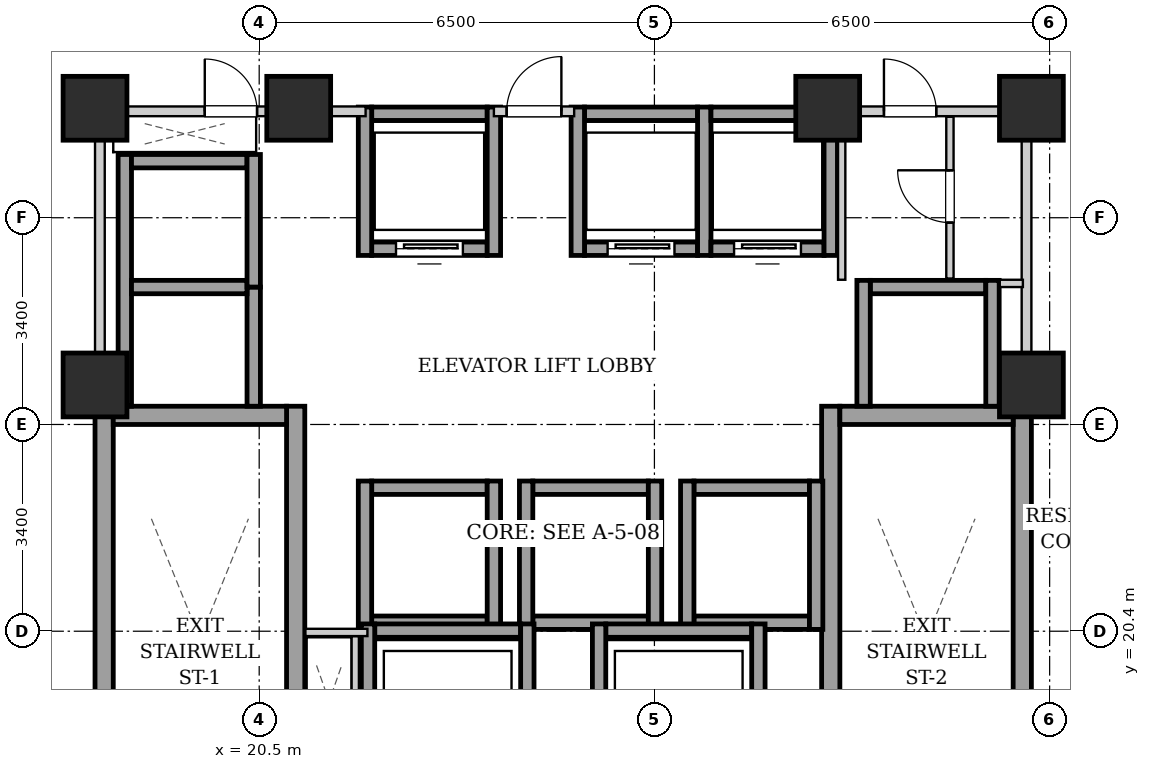
"""IFC4 building model, lengths in metres.
Left out: names, types, materials, properties, quantities, classifications, styles, units other than length and angle.
Written with IfcOpenShell. Run it as: python <this file> out.ifc"""

import sys

from ifc_helpers import new_model, si_unit, direction, frame, frame_2d, origin, origin_2d, place, context, subcontext, project, spatial, rectangle, extrude, element, fill, save


model = new_model("IFC4")
c1 = context("Model", 3, precision=1e-05, world=origin(), true_north=direction((0.0, 1.0)))
c2 = subcontext(c1, "Body", "Model", "MODEL_VIEW")
j1 = project(units=[si_unit("LENGTHUNIT", "METRE"), si_unit("PLANEANGLEUNIT", "RADIAN")], contexts=[c1])
p1 = place(None, origin())
s1 = spatial("IfcSite", under=j1, at=p1, CompositionType="ELEMENT")
p2 = place(p1, origin())
s2 = spatial("IfcBuilding", under=s1, at=p2, CompositionType="ELEMENT")
p3 = place(p2, frame((0.0, 0.0, 91.1)))
s3 = spatial("IfcBuildingStorey", under=s2, at=p3, CompositionType="ELEMENT", Elevation=91.1)
for number, where, z_axis, x_axis in (
    (1, (17.8, 29.0, 0.0), (0.0, 0.0, 1.0), (1.0, 0.0, 0.0)),
    (2, (21.15, 29.0, 0.0), (0.0, 0.0, 1.0), (1.0, 0.0, 0.0)),
    (3, (29.85, 29.0, 0.0), (0.0, 0.0, 1.0), (1.0, 0.0, 0.0)),
    (4, (33.2, 29.0, 0.0), (0.0, 0.0, 1.0), (1.0, 0.0, 0.0)),
    (5, (17.8, 24.45, 0.0), (0.0, 0.0, 1.0), (1.0, 0.0, 0.0)),
    (6, (33.2, 24.45, 0.0), (0.0, 0.0, 1.0), (1.0, 0.0, 0.0)),
):
    element("IfcColumn", number, at=place(p3, frame(where, z_axis=z_axis, x_axis=x_axis)), inside=s3, PredefinedType="COLUMN", context=c2, shape_type="SweptSolid", body=[
        extrude(rectangle(XDim=1.05, YDim=1.05, at=origin_2d()), origin(), (0.0, 0.0, 1.0), 3.2),
    ])
for number, where, z_axis, x_axis in (
    (7, (17.95, 15.1, 0.0), (0.0, 0.0, 1.0), (0.0, 1.0, 0.0)),
    (8, (21.1, 15.1, 0.0), (0.0, 0.0, 1.0), (0.0, 1.0, 0.0)),
):
    element("IfcWall", number, at=place(p3, frame(where, z_axis=z_axis, x_axis=x_axis)), inside=s3, PredefinedType="SHEAR", context=c2, shape_type="SweptSolid", body=[
        extrude(rectangle(XDim=9.0, YDim=0.3, at=frame_2d((4.5, 0.0))), origin(), (0.0, 0.0, 1.0), 2.94),
    ])
p4 = place(p3, frame((18.1, 23.95, 0.0), z_axis=(0.0, 0.0, 1.0), x_axis=(1.0, 0.0, 0.0)))
e9 = element("IfcWall", 9, at=p4, inside=s3, PredefinedType="SHEAR", context=c2, shape_type="SweptSolid", body=[
    extrude(rectangle(XDim=2.85, YDim=0.3, at=frame_2d((1.425, 0.0))), origin(), (0.0, 0.0, 1.0), 2.94),
])
for number, where, z_axis, x_axis in (
    (10, (29.9, 15.1, 0.0), (0.0, 0.0, 1.0), (0.0, 1.0, 0.0)),
    (11, (33.05, 15.1, 0.0), (0.0, 0.0, 1.0), (0.0, 1.0, 0.0)),
):
    element("IfcWall", number, at=place(p3, frame(where, z_axis=z_axis, x_axis=x_axis)), inside=s3, PredefinedType="SHEAR", context=c2, shape_type="SweptSolid", body=[
        extrude(rectangle(XDim=9.0, YDim=0.3, at=frame_2d((4.5, 0.0))), origin(), (0.0, 0.0, 1.0), 2.94),
    ])
p5 = place(p3, frame((30.05, 23.95, 0.0), z_axis=(0.0, 0.0, 1.0), x_axis=(1.0, 0.0, 0.0)))
e12 = element("IfcWall", 12, at=p5, inside=s3, PredefinedType="SHEAR", context=c2, shape_type="SweptSolid", body=[
    extrude(rectangle(XDim=2.85, YDim=0.3, at=frame_2d((1.425, 0.0))), origin(), (0.0, 0.0, 1.0), 2.94),
])
p6 = place(p3, frame((22.35, 26.69, 0.0), z_axis=(0.0, 0.0, 1.0), x_axis=(1.0, 0.0, 0.0)))
e13 = element("IfcWall", 13, at=p6, inside=s3, PredefinedType="SHEAR", context=c2, shape_type="SweptSolid", body=[
    extrude(rectangle(XDim=1.9, YDim=0.22, at=frame_2d((0.95, 0.0))), origin(), (0.0, 0.0, 1.0), 2.94),
])
p7 = place(p6, frame((0.4, 0.0, 0.0)))
e14 = element("IfcOpeningElement", 14, at=p7, cuts=e13, PredefinedType="OPENING", context=c2, shape_type="SweptSolid", body=[
    extrude(rectangle(XDim=1.1, YDim=2.15, at=frame_2d((0.55, 1.075))), frame((0.0, 0.12, 0.0), z_axis=(0.0, -1.0, 0.0), x_axis=(1.0, 0.0, 0.0)), (0.0, 0.0, 1.0), 0.24),
])
p8 = place(p3, frame((22.35, 28.91, 0.0), z_axis=(0.0, 0.0, 1.0), x_axis=(1.0, 0.0, 0.0)))
e15 = element("IfcWall", 15, at=p8, inside=s3, PredefinedType="SHEAR", context=c2, shape_type="SweptSolid", body=[
    extrude(rectangle(XDim=1.9, YDim=0.22, at=frame_2d((0.95, 0.0))), origin(), (0.0, 0.0, 1.0), 2.94),
])
for number, where, z_axis, x_axis in (
    (16, (22.24, 26.58, 0.0), (0.0, 0.0, 1.0), (0.0, 1.0, 0.0)),
    (17, (24.36, 26.58, 0.0), (0.0, 0.0, 1.0), (0.0, 1.0, 0.0)),
):
    element("IfcWall", number, at=place(p3, frame(where, z_axis=z_axis, x_axis=x_axis)), inside=s3, PredefinedType="SHEAR", context=c2, shape_type="SweptSolid", body=[
        extrude(rectangle(XDim=2.44, YDim=0.22, at=frame_2d((1.22, 0.0))), origin(), (0.0, 0.0, 1.0), 2.94),
    ])
p9 = place(p3, frame((25.85, 26.69, 0.0), z_axis=(0.0, 0.0, 1.0), x_axis=(1.0, 0.0, 0.0)))
e18 = element("IfcWall", 18, at=p9, inside=s3, PredefinedType="SHEAR", context=c2, shape_type="SweptSolid", body=[
    extrude(rectangle(XDim=1.86, YDim=0.22, at=frame_2d((0.93, 0.0))), origin(), (0.0, 0.0, 1.0), 2.94),
])
p10 = place(p9, frame((0.38, 0.0, 0.0)))
e19 = element("IfcOpeningElement", 19, at=p10, cuts=e18, PredefinedType="OPENING", context=c2, shape_type="SweptSolid", body=[
    extrude(rectangle(XDim=1.1, YDim=2.15, at=frame_2d((0.55, 1.075))), frame((0.0, 0.12, 0.0), z_axis=(0.0, -1.0, 0.0), x_axis=(1.0, 0.0, 0.0)), (0.0, 0.0, 1.0), 0.24),
])
p11 = place(p3, frame((25.85, 28.91, 0.0), z_axis=(0.0, 0.0, 1.0), x_axis=(1.0, 0.0, 0.0)))
e20 = element("IfcWall", 20, at=p11, inside=s3, PredefinedType="SHEAR", context=c2, shape_type="SweptSolid", body=[
    extrude(rectangle(XDim=1.86, YDim=0.22, at=frame_2d((0.93, 0.0))), origin(), (0.0, 0.0, 1.0), 2.94),
])
for number, where, z_axis, x_axis in (
    (21, (25.74, 26.58, 0.0), (0.0, 0.0, 1.0), (0.0, 1.0, 0.0)),
    (22, (27.82, 26.58, 0.0), (0.0, 0.0, 1.0), (0.0, 1.0, 0.0)),
):
    element("IfcWall", number, at=place(p3, frame(where, z_axis=z_axis, x_axis=x_axis)), inside=s3, PredefinedType="SHEAR", context=c2, shape_type="SweptSolid", body=[
        extrude(rectangle(XDim=2.44, YDim=0.22, at=frame_2d((1.22, 0.0))), origin(), (0.0, 0.0, 1.0), 2.94),
    ])
p12 = place(p3, frame((27.93, 26.69, 0.0), z_axis=(0.0, 0.0, 1.0), x_axis=(1.0, 0.0, 0.0)))
e23 = element("IfcWall", 23, at=p12, inside=s3, PredefinedType="SHEAR", context=c2, shape_type="SweptSolid", body=[
    extrude(rectangle(XDim=1.86, YDim=0.22, at=frame_2d((0.93, 0.0))), origin(), (0.0, 0.0, 1.0), 2.94),
])
p13 = place(p12, frame((0.38, 0.0, 0.0)))
e24 = element("IfcOpeningElement", 24, at=p13, cuts=e23, PredefinedType="OPENING", context=c2, shape_type="SweptSolid", body=[
    extrude(rectangle(XDim=1.1, YDim=2.15, at=frame_2d((0.55, 1.075))), frame((0.0, 0.12, 0.0), z_axis=(0.0, -1.0, 0.0), x_axis=(1.0, 0.0, 0.0)), (0.0, 0.0, 1.0), 0.24),
])
p14 = place(p3, frame((27.93, 28.91, 0.0), z_axis=(0.0, 0.0, 1.0), x_axis=(1.0, 0.0, 0.0)))
e25 = element("IfcWall", 25, at=p14, inside=s3, PredefinedType="SHEAR", context=c2, shape_type="SweptSolid", body=[
    extrude(rectangle(XDim=1.86, YDim=0.22, at=frame_2d((0.93, 0.0))), origin(), (0.0, 0.0, 1.0), 2.94),
])
p15 = place(p3, frame((29.9, 26.58, 0.0), z_axis=(0.0, 0.0, 1.0), x_axis=(0.0, 1.0, 0.0)))
e26 = element("IfcWall", 26, at=p15, inside=s3, PredefinedType="SHEAR", context=c2, shape_type="SweptSolid", body=[
    extrude(rectangle(XDim=2.44, YDim=0.22, at=frame_2d((1.22, 0.0))), origin(), (0.0, 0.0, 1.0), 2.94),
])
for number, where, z_axis, x_axis in (
    (27, (22.35, 20.54, 0.0), (0.0, 0.0, 1.0), (1.0, 0.0, 0.0)),
    (28, (22.35, 22.76, 0.0), (0.0, 0.0, 1.0), (1.0, 0.0, 0.0)),
):
    element("IfcWall", number, at=place(p3, frame(where, z_axis=z_axis, x_axis=x_axis)), inside=s3, PredefinedType="SHEAR", context=c2, shape_type="SweptSolid", body=[
        extrude(rectangle(XDim=1.9, YDim=0.22, at=frame_2d((0.95, 0.0))), origin(), (0.0, 0.0, 1.0), 2.94),
    ])
for number, where, z_axis, x_axis in (
    (29, (22.24, 20.43, 0.0), (0.0, 0.0, 1.0), (0.0, 1.0, 0.0)),
    (30, (24.36, 20.43, 0.0), (0.0, 0.0, 1.0), (0.0, 1.0, 0.0)),
):
    element("IfcWall", number, at=place(p3, frame(where, z_axis=z_axis, x_axis=x_axis)), inside=s3, PredefinedType="SHEAR", context=c2, shape_type="SweptSolid", body=[
        extrude(rectangle(XDim=2.44, YDim=0.22, at=frame_2d((1.22, 0.0))), origin(), (0.0, 0.0, 1.0), 2.94),
    ])
for number, where, z_axis, x_axis in (
    (31, (25.0, 20.54, 0.0), (0.0, 0.0, 1.0), (1.0, 0.0, 0.0)),
    (32, (25.0, 22.76, 0.0), (0.0, 0.0, 1.0), (1.0, 0.0, 0.0)),
):
    element("IfcWall", number, at=place(p3, frame(where, z_axis=z_axis, x_axis=x_axis)), inside=s3, PredefinedType="SHEAR", context=c2, shape_type="SweptSolid", body=[
        extrude(rectangle(XDim=1.9, YDim=0.22, at=frame_2d((0.95, 0.0))), origin(), (0.0, 0.0, 1.0), 2.94),
    ])
for number, where, z_axis, x_axis in (
    (33, (24.89, 20.43, 0.0), (0.0, 0.0, 1.0), (0.0, 1.0, 0.0)),
    (34, (27.01, 20.43, 0.0), (0.0, 0.0, 1.0), (0.0, 1.0, 0.0)),
):
    element("IfcWall", number, at=place(p3, frame(where, z_axis=z_axis, x_axis=x_axis)), inside=s3, PredefinedType="SHEAR", context=c2, shape_type="SweptSolid", body=[
        extrude(rectangle(XDim=2.44, YDim=0.22, at=frame_2d((1.22, 0.0))), origin(), (0.0, 0.0, 1.0), 2.94),
    ])
for number, where, z_axis, x_axis in (
    (35, (27.65, 20.54, 0.0), (0.0, 0.0, 1.0), (1.0, 0.0, 0.0)),
    (36, (27.65, 22.76, 0.0), (0.0, 0.0, 1.0), (1.0, 0.0, 0.0)),
):
    element("IfcWall", number, at=place(p3, frame(where, z_axis=z_axis, x_axis=x_axis)), inside=s3, PredefinedType="SHEAR", context=c2, shape_type="SweptSolid", body=[
        extrude(rectangle(XDim=1.9, YDim=0.22, at=frame_2d((0.95, 0.0))), origin(), (0.0, 0.0, 1.0), 2.94),
    ])
for number, where, z_axis, x_axis in (
    (37, (27.54, 20.43, 0.0), (0.0, 0.0, 1.0), (0.0, 1.0, 0.0)),
    (38, (29.66, 20.43, 0.0), (0.0, 0.0, 1.0), (0.0, 1.0, 0.0)),
):
    element("IfcWall", number, at=place(p3, frame(where, z_axis=z_axis, x_axis=x_axis)), inside=s3, PredefinedType="SHEAR", context=c2, shape_type="SweptSolid", body=[
        extrude(rectangle(XDim=2.44, YDim=0.22, at=frame_2d((1.22, 0.0))), origin(), (0.0, 0.0, 1.0), 2.94),
    ])
p16 = place(p3, frame((18.29, 24.1, 0.0), z_axis=(0.0, 0.0, 1.0), x_axis=(0.0, 1.0, 0.0)))
e39 = element("IfcWall", 39, at=p16, inside=s3, PredefinedType="SHEAR", context=c2, shape_type="SweptSolid", body=[
    extrude(rectangle(XDim=4.14, YDim=0.22, at=frame_2d((2.07, 0.0))), origin(), (0.0, 0.0, 1.0), 2.94),
])
p17 = place(p3, frame((20.41, 24.1, 0.0), z_axis=(0.0, 0.0, 1.0), x_axis=(0.0, 1.0, 0.0)))
e40 = element("IfcWall", 40, at=p17, inside=s3, PredefinedType="SHEAR", context=c2, shape_type="SweptSolid", body=[
    extrude(rectangle(XDim=1.96, YDim=0.22, at=frame_2d((0.98, 0.0))), origin(), (0.0, 0.0, 1.0), 2.94),
])
for number, where, z_axis, x_axis in (
    (41, (18.4, 26.06, 0.0), (0.0, 0.0, 1.0), (1.0, 0.0, 0.0)),
    (42, (18.4, 28.13, 0.0), (0.0, 0.0, 1.0), (1.0, 0.0, 0.0)),
):
    element("IfcWall", number, at=place(p3, frame(where, z_axis=z_axis, x_axis=x_axis)), inside=s3, PredefinedType="SHEAR", context=c2, shape_type="SweptSolid", body=[
        extrude(rectangle(XDim=1.9, YDim=0.22, at=frame_2d((0.95, 0.0))), origin(), (0.0, 0.0, 1.0), 2.94),
    ])
p18 = place(p3, frame((20.41, 26.06, 0.0), z_axis=(0.0, 0.0, 1.0), x_axis=(0.0, 1.0, 0.0)))
e43 = element("IfcWall", 43, at=p18, inside=s3, PredefinedType="SHEAR", context=c2, shape_type="SweptSolid", body=[
    extrude(rectangle(XDim=2.18, YDim=0.22, at=frame_2d((1.09, 0.0))), origin(), (0.0, 0.0, 1.0), 2.94),
])
p19 = place(p3, frame((30.55, 26.06, 0.0), z_axis=(0.0, 0.0, 1.0), x_axis=(1.0, 0.0, 0.0)))
e44 = element("IfcWall", 44, at=p19, inside=s3, PredefinedType="SHEAR", context=c2, shape_type="SweptSolid", body=[
    extrude(rectangle(XDim=1.9, YDim=0.22, at=frame_2d((0.95, 0.0))), origin(), (0.0, 0.0, 1.0), 2.94),
])
for number, where, z_axis, x_axis in (
    (45, (30.44, 24.1, 0.0), (0.0, 0.0, 1.0), (0.0, 1.0, 0.0)),
    (46, (32.56, 24.1, 0.0), (0.0, 0.0, 1.0), (0.0, 1.0, 0.0)),
):
    element("IfcWall", number, at=place(p3, frame(where, z_axis=z_axis, x_axis=x_axis)), inside=s3, PredefinedType="SHEAR", context=c2, shape_type="SweptSolid", body=[
        extrude(rectangle(XDim=2.07, YDim=0.22, at=frame_2d((1.035, 0.0))), origin(), (0.0, 0.0, 1.0), 2.94),
    ])
p20 = place(p3, frame((22.4, 20.41, 0.0), z_axis=(0.0, 0.0, 1.0), x_axis=(1.0, 0.0, 0.0)))
e47 = element("IfcWall", 47, at=p20, inside=s3, PredefinedType="SHEAR", context=c2, shape_type="SweptSolid", body=[
    extrude(rectangle(XDim=2.4, YDim=0.22, at=frame_2d((1.2, 0.0))), origin(), (0.0, 0.0, 1.0), 2.94),
])
for number, where, z_axis, x_axis in (
    (48, (22.29, 17.98, 0.0), (0.0, 0.0, 1.0), (0.0, 1.0, 0.0)),
    (49, (24.91, 17.98, 0.0), (0.0, 0.0, 1.0), (0.0, 1.0, 0.0)),
):
    element("IfcWall", number, at=place(p3, frame(where, z_axis=z_axis, x_axis=x_axis)), inside=s3, PredefinedType="SHEAR", context=c2, shape_type="SweptSolid", body=[
        extrude(rectangle(XDim=2.54, YDim=0.22, at=frame_2d((1.27, 0.0))), origin(), (0.0, 0.0, 1.0), 2.94),
    ])
p21 = place(p3, frame((26.2, 20.41, 0.0), z_axis=(0.0, 0.0, 1.0), x_axis=(1.0, 0.0, 0.0)))
e50 = element("IfcWall", 50, at=p21, inside=s3, PredefinedType="SHEAR", context=c2, shape_type="SweptSolid", body=[
    extrude(rectangle(XDim=2.4, YDim=0.22, at=frame_2d((1.2, 0.0))), origin(), (0.0, 0.0, 1.0), 2.94),
])
for number, where, z_axis, x_axis in (
    (51, (26.09, 17.98, 0.0), (0.0, 0.0, 1.0), (0.0, 1.0, 0.0)),
    (52, (28.71, 17.98, 0.0), (0.0, 0.0, 1.0), (0.0, 1.0, 0.0)),
):
    element("IfcWall", number, at=place(p3, frame(where, z_axis=z_axis, x_axis=x_axis)), inside=s3, PredefinedType="SHEAR", context=c2, shape_type="SweptSolid", body=[
        extrude(rectangle(XDim=2.54, YDim=0.22, at=frame_2d((1.27, 0.0))), origin(), (0.0, 0.0, 1.0), 2.94),
    ])
for number, where, z_axis, x_axis in (
    (53, (17.88, 24.12, 0.0), (0.0, 0.0, 1.0), (0.0, 1.0, 0.0)),
    (54, (33.12, 24.12, 0.0), (0.0, 0.0, 1.0), (0.0, 1.0, 0.0)),
):
    element("IfcWall", number, at=place(p3, frame(where, z_axis=z_axis, x_axis=x_axis)), inside=s3, PredefinedType="PARTITIONING", context=c2, shape_type="SweptSolid", body=[
        extrude(rectangle(XDim=4.76, YDim=0.16, at=frame_2d((2.38, 0.0))), origin(), (0.0, 0.0, 1.0), 2.94),
    ])
p22 = place(p3, frame((24.36, 28.95, 0.0), z_axis=(0.0, 0.0, 1.0), x_axis=(1.0, 0.0, 0.0)))
e55 = element("IfcWall", 55, at=p22, inside=s3, PredefinedType="PARTITIONING", context=c2, shape_type="SweptSolid", body=[
    extrude(rectangle(XDim=1.32, YDim=0.16, at=frame_2d((0.66, 0.0))), origin(), (0.0, 0.0, 1.0), 2.309),
])
p23 = place(p22, frame((0.21, 0.0, 0.0)))
e56 = element("IfcOpeningElement", 56, at=p23, cuts=e55, PredefinedType="OPENING", context=c2, shape_type="SweptSolid", body=[
    extrude(rectangle(XDim=0.9, YDim=2.05, at=frame_2d((0.45, 1.025))), frame((0.0, 0.09, 0.0), z_axis=(0.0, -1.0, 0.0), x_axis=(1.0, 0.0, 0.0)), (0.0, 0.0, 1.0), 0.18),
])
p24 = place(p3, frame((17.96, 28.95, 0.0), z_axis=(0.0, 0.0, 1.0), x_axis=(1.0, 0.0, 0.0)))
e57 = element("IfcWall", 57, at=p24, inside=s3, PredefinedType="PARTITIONING", context=c2, shape_type="SweptSolid", body=[
    extrude(rectangle(XDim=4.29, YDim=0.16, at=frame_2d((2.145, 0.0))), origin(), (0.0, 0.0, 1.0), 2.309),
])
p25 = place(p24, frame((1.645, 0.0, 0.0)))
e58 = element("IfcOpeningElement", 58, at=p25, cuts=e57, PredefinedType="OPENING", context=c2, shape_type="SweptSolid", body=[
    extrude(rectangle(XDim=0.86, YDim=2.05, at=frame_2d((0.43, 1.025))), frame((0.0, 0.09, 0.0), z_axis=(0.0, -1.0, 0.0), x_axis=(1.0, 0.0, 0.0)), (0.0, 0.0, 1.0), 0.18),
])
p26 = place(p3, frame((22.08, 18.2, 0.0), z_axis=(0.0, 0.0, 1.0), x_axis=(0.0, 1.0, 0.0)))
e59 = element("IfcWall", 59, at=p26, inside=s3, PredefinedType="PARTITIONING", context=c2, shape_type="SweptSolid", body=[
    extrude(rectangle(XDim=2.12, YDim=0.12, at=frame_2d((1.06, 0.0))), origin(), (0.0, 0.0, 1.0), 2.94),
])
p27 = place(p3, frame((22.28, 20.38, 0.0), z_axis=(0.0, 0.0, 1.0), x_axis=(-1.0, 0.0, 0.0)))
e60 = element("IfcWall", 60, at=p27, inside=s3, PredefinedType="PARTITIONING", context=c2, shape_type="SweptSolid", body=[
    extrude(rectangle(XDim=1.02, YDim=0.12, at=frame_2d((0.51, 0.0))), origin(), (0.0, 0.0, 1.0), 2.94),
])
p28 = place(p3, frame((30.08, 26.18, 0.0), z_axis=(0.0, 0.0, 1.0), x_axis=(0.0, 1.0, 0.0)))
e61 = element("IfcWall", 61, at=p28, inside=s3, PredefinedType="PARTITIONING", context=c2, shape_type="SweptSolid", body=[
    extrude(rectangle(XDim=2.68, YDim=0.12, at=frame_2d((1.34, 0.0))), origin(), (0.0, 0.0, 1.0), 2.94),
])
p29 = place(p3, frame((32.68, 26.12, 0.0), z_axis=(0.0, 0.0, 1.0), x_axis=(1.0, 0.0, 0.0)))
e62 = element("IfcWall", 62, at=p29, inside=s3, PredefinedType="PARTITIONING", context=c2, shape_type="SweptSolid", body=[
    extrude(rectangle(XDim=0.38, YDim=0.12, at=frame_2d((0.19, 0.0))), origin(), (0.0, 0.0, 1.0), 2.94),
])
p30 = place(p3, frame((31.86, 26.2, 0.0), z_axis=(0.0, 0.0, 1.0), x_axis=(0.0, 1.0, 0.0)))
e63 = element("IfcWall", 63, at=p30, inside=s3, PredefinedType="PARTITIONING", context=c2, shape_type="SweptSolid", body=[
    extrude(rectangle(XDim=2.66, YDim=0.12, at=frame_2d((1.33, 0.0))), origin(), (0.0, 0.0, 1.0), 2.94),
])
p31 = place(p30, frame((0.92, 0.0, 0.0)))
e64 = element("IfcOpeningElement", 64, at=p31, cuts=e63, PredefinedType="OPENING", context=c2, shape_type="SweptSolid", body=[
    extrude(rectangle(XDim=0.86, YDim=2.05, at=frame_2d((0.43, 1.025))), frame((0.0, 0.07, 0.0), z_axis=(0.0, -1.0, 0.0), x_axis=(1.0, 0.0, 0.0)), (0.0, 0.0, 1.0), 0.14),
])
p32 = place(p3, frame((30.08, 28.95, 0.0), z_axis=(0.0, 0.0, 1.0), x_axis=(1.0, 0.0, 0.0)))
e65 = element("IfcWall", 65, at=p32, inside=s3, PredefinedType="PARTITIONING", context=c2, shape_type="SweptSolid", body=[
    extrude(rectangle(XDim=2.96, YDim=0.16, at=frame_2d((1.48, 0.0))), origin(), (0.0, 0.0, 1.0), 2.94),
])
p33 = place(p32, frame((0.695, 0.0, 0.0)))
e66 = element("IfcOpeningElement", 66, at=p33, cuts=e65, PredefinedType="OPENING", context=c2, shape_type="SweptSolid", body=[
    extrude(rectangle(XDim=0.86, YDim=2.05, at=frame_2d((0.43, 1.025))), frame((0.0, 0.09, 0.0), z_axis=(0.0, -1.0, 0.0), x_axis=(1.0, 0.0, 0.0)), (0.0, 0.0, 1.0), 0.18),
])
p34 = place(p7, origin())
e67 = element("IfcDoor", 67, at=p34, inside=s3, OperationType="SLIDING_TO_LEFT", PredefinedType="DOOR", context=c2, shape_type="SweptSolid", body=[
    extrude(rectangle(XDim=1.1, YDim=2.15, at=frame_2d((0.55, 1.075))), frame((0.0, 0.025, 0.0), z_axis=(0.0, -1.0, 0.0), x_axis=(1.0, 0.0, 0.0)), (0.0, 0.0, 1.0), 0.05),
])
fill(e14, e67)
p35 = place(p10, origin())
e68 = element("IfcDoor", 68, at=p35, inside=s3, OperationType="SLIDING_TO_LEFT", PredefinedType="DOOR", context=c2, shape_type="SweptSolid", body=[
    extrude(rectangle(XDim=1.1, YDim=2.15, at=frame_2d((0.55, 1.075))), frame((0.0, 0.025, 0.0), z_axis=(0.0, -1.0, 0.0), x_axis=(1.0, 0.0, 0.0)), (0.0, 0.0, 1.0), 0.05),
])
fill(e19, e68)
p36 = place(p13, origin())
e69 = element("IfcDoor", 69, at=p36, inside=s3, OperationType="SLIDING_TO_LEFT", PredefinedType="DOOR", context=c2, shape_type="SweptSolid", body=[
    extrude(rectangle(XDim=1.1, YDim=2.15, at=frame_2d((0.55, 1.075))), frame((0.0, 0.025, 0.0), z_axis=(0.0, -1.0, 0.0), x_axis=(1.0, 0.0, 0.0)), (0.0, 0.0, 1.0), 0.05),
])
fill(e24, e69)
p37 = place(p23, origin())
e70 = element("IfcDoor", 70, at=p37, inside=s3, OperationType="SINGLE_SWING_RIGHT", PredefinedType="DOOR", context=c2, shape_type="SweptSolid", body=[
    extrude(rectangle(XDim=0.9, YDim=2.05, at=frame_2d((0.45, 1.025))), frame((0.0, 0.025, 0.0), z_axis=(0.0, -1.0, 0.0), x_axis=(1.0, 0.0, 0.0)), (0.0, 0.0, 1.0), 0.05),
])
fill(e56, e70)
p38 = place(p25, origin())
e71 = element("IfcDoor", 71, at=p38, inside=s3, OperationType="SINGLE_SWING_LEFT", PredefinedType="DOOR", context=c2, shape_type="SweptSolid", body=[
    extrude(rectangle(XDim=0.86, YDim=2.05, at=frame_2d((0.43, 1.025))), frame((0.0, 0.025, 0.0), z_axis=(0.0, -1.0, 0.0), x_axis=(1.0, 0.0, 0.0)), (0.0, 0.0, 1.0), 0.05),
])
fill(e58, e71)
p39 = place(p31, origin())
e72 = element("IfcDoor", 72, at=p39, inside=s3, OperationType="SINGLE_SWING_RIGHT", PredefinedType="DOOR", context=c2, shape_type="SweptSolid", body=[
    extrude(rectangle(XDim=0.86, YDim=2.05, at=frame_2d((0.43, 1.025))), frame((0.0, 0.025, 0.0), z_axis=(0.0, -1.0, 0.0), x_axis=(1.0, 0.0, 0.0)), (0.0, 0.0, 1.0), 0.05),
])
fill(e64, e72)
p40 = place(p33, origin())
e73 = element("IfcDoor", 73, at=p40, inside=s3, OperationType="SINGLE_SWING_LEFT", PredefinedType="DOOR", context=c2, shape_type="SweptSolid", body=[
    extrude(rectangle(XDim=0.86, YDim=2.05, at=frame_2d((0.43, 1.025))), frame((0.0, 0.025, 0.0), z_axis=(0.0, -1.0, 0.0), x_axis=(1.0, 0.0, 0.0)), (0.0, 0.0, 1.0), 0.05),
])
fill(e66, e73)
save(model, sys.argv[1])
